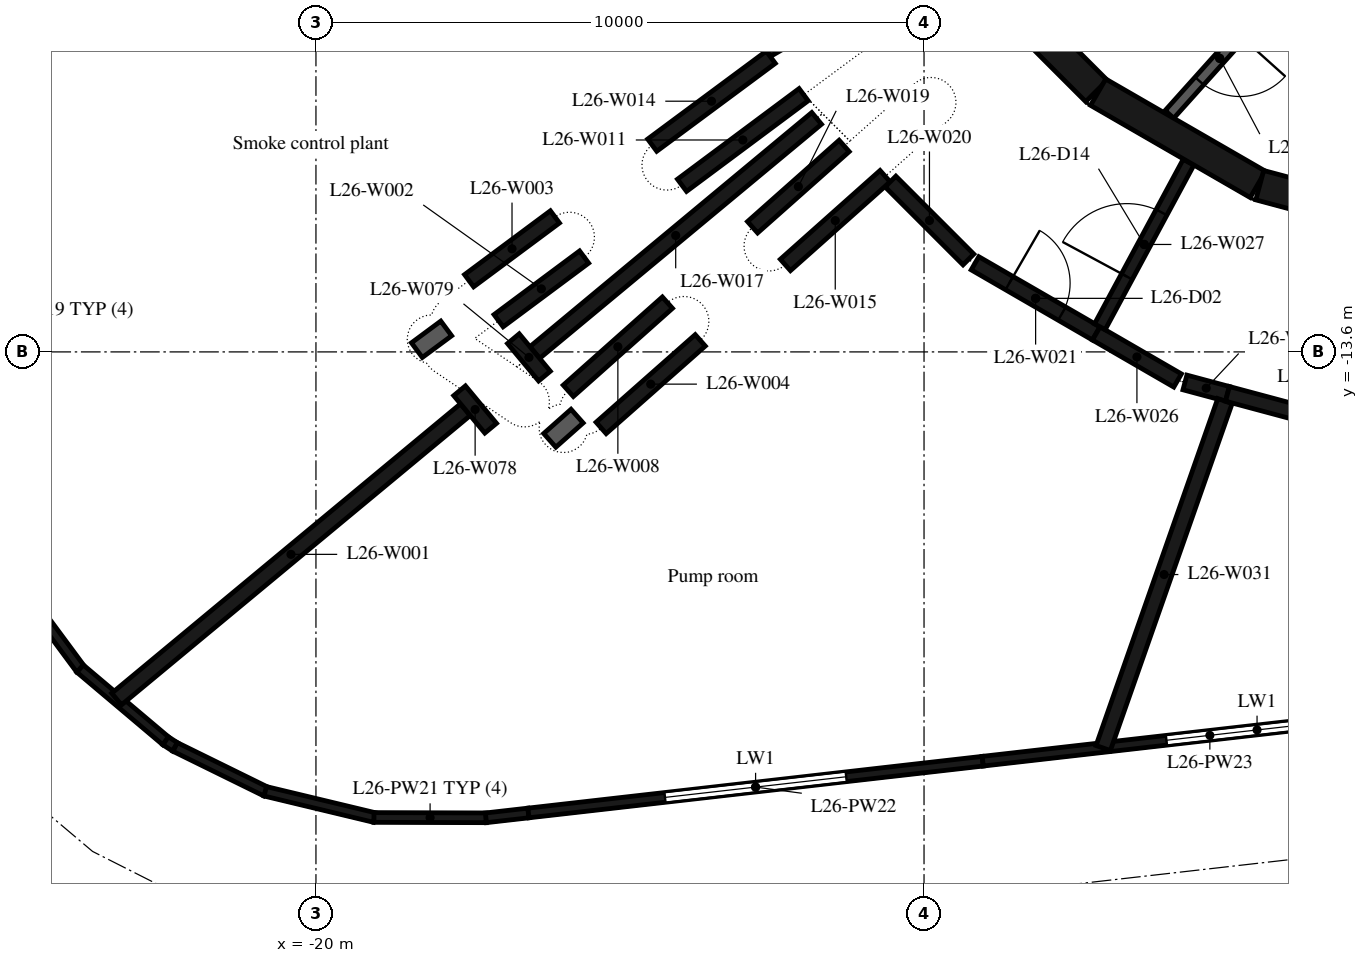
"""IFC4 building model, lengths in metres.
Left out: names, types, materials, properties, quantities, classifications, styles, units other than length and angle.
Written with IfcOpenShell. Run it as: python <this file> out.ifc"""

import sys

from ifc_helpers import new_model, si_unit, direction, frame, frame_2d, origin, place, context, subcontext, project, spatial, rectangle, extrude, element, fill, save


model = new_model("IFC4")
c1 = context("Model", 3, precision=1e-05, world=origin(), true_north=direction((0.0, 1.0)))
c2 = subcontext(c1, "Body", "Model", "MODEL_VIEW")
j1 = project(units=[si_unit("LENGTHUNIT", "METRE"), si_unit("PLANEANGLEUNIT", "RADIAN")], contexts=[c1])
p1 = place(None, origin())
s1 = spatial("IfcSite", under=j1, at=p1, CompositionType="ELEMENT")
p2 = place(p1, origin())
s2 = spatial("IfcBuilding", under=s1, at=p2, CompositionType="ELEMENT")
p3 = place(p2, frame((0.0, 0.0, 108.2)))
s3 = spatial("IfcBuildingStorey", under=s2, at=p3, CompositionType="ELEMENT", Elevation=108.2)
p4 = place(p3, frame((-22.084, -2.696, 0.0), z_axis=(0.0, 0.0, 1.0), x_axis=(-0.398737984544, -0.917064893932, 0.0)))
e1 = element("IfcWall", 1, at=p4, inside=s3, PredefinedType="STANDARD", context=c2, shape_type="SweptSolid", body=[
    extrude(rectangle(XDim=7.519, YDim=0.16, at=frame_2d((3.759, 0.0))), origin(), (0.0, 0.0, 1.0), 4.75),
])
p5 = place(p3, frame((-24.972, -17.329, 0.0), z_axis=(0.0, 0.0, 1.0), x_axis=(0.594788380253, -0.803882318947, 0.0)))
e2 = element("IfcWall", 2, at=p5, inside=s3, PredefinedType="STANDARD", context=c2, shape_type="SweptSolid", body=[
    extrude(rectangle(XDim=1.848, YDim=0.16, at=frame_2d((0.924, 0.0))), origin(), (0.0, 0.0, 1.0), 4.75),
])
p6 = place(p3, frame((-23.879, -18.808, 0.0), z_axis=(0.0, 0.0, 1.0), x_axis=(0.76410813609, -0.645088177198, 0.0)))
e3 = element("IfcWall", 3, at=p6, inside=s3, PredefinedType="STANDARD", context=c2, shape_type="SweptSolid", body=[
    extrude(rectangle(XDim=1.846, YDim=0.16, at=frame_2d((0.923, 0.0))), origin(), (0.0, 0.0, 1.0), 4.75),
])
p7 = place(p3, frame((-22.472, -19.995, 0.0), z_axis=(0.0, 0.0, 1.0), x_axis=(0.840238765122, -0.542216578118, 0.0)))
e4 = element("IfcWall", 4, at=p7, inside=s3, PredefinedType="STANDARD", context=c2, shape_type="SweptSolid", body=[
    extrude(rectangle(XDim=0.186, YDim=0.16, at=frame_2d((0.093, 0.0))), origin(), (0.0, 0.0, 1.0), 4.75),
])
p8 = place(p3, frame((-22.316, -20.096, 0.0), z_axis=(0.0, 0.0, 1.0), x_axis=(0.897492078532, -0.441030576007, 0.0)))
e5 = element("IfcWall", 5, at=p8, inside=s3, PredefinedType="STANDARD", context=c2, shape_type="SweptSolid", body=[
    extrude(rectangle(XDim=1.661, YDim=0.16, at=frame_2d((0.831, 0.0))), origin(), (0.0, 0.0, 1.0), 4.75),
])
p9 = place(p3, frame((-20.833, -20.826, 0.0), z_axis=(0.0, 0.0, 1.0), x_axis=(0.972369310611, -0.233447903784, 0.0)))
e6 = element("IfcWall", 6, at=p9, inside=s3, PredefinedType="STANDARD", context=c2, shape_type="SweptSolid", body=[
    extrude(rectangle(XDim=1.848, YDim=0.16, at=frame_2d((0.924, 0.0))), origin(), (0.0, 0.0, 1.0), 4.75),
])
p10 = place(p3, frame((-19.046, -21.256, 0.0), z_axis=(0.0, 0.0, 1.0), x_axis=(0.999995373376, -0.003041911597, 0.0)))
e7 = element("IfcWall", 7, at=p10, inside=s3, PredefinedType="STANDARD", context=c2, shape_type="SweptSolid", body=[
    extrude(rectangle(XDim=1.846, YDim=0.16, at=frame_2d((0.923, 0.0))), origin(), (0.0, 0.0, 1.0), 4.75),
])
p11 = place(p3, frame((-17.205, -21.262, 0.0), z_axis=(0.0, 0.0, 1.0), x_axis=(0.993584007949, 0.113096503698, 0.0)))
e8 = element("IfcWall", 8, at=p11, inside=s3, PredefinedType="STANDARD", context=c2, shape_type="SweptSolid", body=[
    extrude(rectangle(XDim=0.704, YDim=0.16, at=frame_2d((0.352, 0.0))), origin(), (0.0, 0.0, 1.0), 4.75),
])
p12 = place(p3, frame((-16.505, -21.182, 0.0), z_axis=(0.0, 0.0, 1.0), x_axis=(0.993573424553, 0.113189443072, 0.0)))
e9 = element("IfcWall", 9, at=p12, inside=s3, PredefinedType="STANDARD", context=c2, shape_type="SweptSolid", body=[
    extrude(rectangle(XDim=7.519, YDim=0.16, at=frame_2d((3.76, 0.0))), origin(), (0.0, 0.0, 1.0), 4.75),
])
p13 = place(p12, frame((2.26, 0.0, 1.0)))
e10 = element("IfcOpeningElement", 10, at=p13, cuts=e9, PredefinedType="OPENING", context=c2, shape_type="SweptSolid", body=[
    extrude(rectangle(XDim=3.0, YDim=2.2, at=frame_2d((1.5, 1.1))), frame((0.0, 0.09, 0.0), z_axis=(0.0, -1.0, 0.0), x_axis=(1.0, 0.0, 0.0)), (0.0, 0.0, 1.0), 0.18),
])
p14 = place(p3, frame((-9.035, -20.331, 0.0), z_axis=(0.0, 0.0, 1.0), x_axis=(0.993569356187, 0.113225149352, 0.0)))
e11 = element("IfcWall", 11, at=p14, inside=s3, PredefinedType="STANDARD", context=c2, shape_type="SweptSolid", body=[
    extrude(rectangle(XDim=7.519, YDim=0.16, at=frame_2d((3.759, 0.0))), origin(), (0.0, 0.0, 1.0), 4.75),
])
p15 = place(p14, frame((3.041, 0.0, 1.0)))
e12 = element("IfcOpeningElement", 12, at=p15, cuts=e11, PredefinedType="OPENING", context=c2, shape_type="SweptSolid", body=[
    extrude(rectangle(XDim=3.0, YDim=2.2, at=frame_2d((1.5, 1.1))), frame((0.0, 0.09, 0.0), z_axis=(0.0, -1.0, 0.0), x_axis=(1.0, 0.0, 0.0)), (0.0, 0.0, 1.0), 0.18),
])
p16 = place(p3, frame((-9.308, -7.164, 0.0), z_axis=(0.0, 0.0, 1.0), x_axis=(0.707106781187, -0.707106781187, 0.0)))
e13 = element("IfcWall", 13, at=p16, inside=s3, PredefinedType="SHEAR", context=c2, shape_type="SweptSolid", body=[
    extrude(rectangle(XDim=3.032, YDim=0.5, at=frame_2d((1.516, 0.0))), origin(), (0.0, 0.0, 1.0), 4.75),
])
for number, where, z_axis, x_axis in (
    (14, (-7.137, -9.329, 0.0), (0.0, 0.0, 1.0), (0.866, -0.5, 0.0)),
    (15, (-4.479, -10.858, 0.0), (0.0, 0.0, 1.0), (0.966, -0.259, 0.0)),
):
    element("IfcWall", number, at=place(p3, frame(where, z_axis=z_axis, x_axis=x_axis)), inside=s3, PredefinedType="SHEAR", context=c2, shape_type="SweptSolid", body=[
        extrude(rectangle(XDim=3.033, YDim=0.5, at=frame_2d((1.516, 0.0))), origin(), (0.0, 0.0, 1.0), 4.75),
    ])
p17 = place(p3, frame((-4.311, -7.851, 0.0), z_axis=(0.0, 0.0, 1.0), x_axis=(-0.667869133096, -0.744278725383, 0.0)))
e16 = element("IfcWall", 16, at=p17, inside=s3, PredefinedType="PARTITIONING", context=c2, shape_type="SweptSolid", body=[
    extrude(rectangle(XDim=2.476, YDim=0.19, at=frame_2d((1.238, 0.0))), origin(), (0.0, 0.0, 1.0), 4.75),
])
p18 = place(p17, frame((0.738, 0.0, 0.0)))
e17 = element("IfcOpeningElement", 17, at=p18, cuts=e16, PredefinedType="OPENING", context=c2, shape_type="SweptSolid", body=[
    extrude(rectangle(XDim=1.0, YDim=2.4, at=frame_2d((0.5, 1.2))), frame((0.0, 0.105, 0.0), z_axis=(0.0, -1.0, 0.0), x_axis=(1.0, 0.0, 0.0)), (0.0, 0.0, 1.0), 0.21),
])
p19 = place(p3, frame((-17.542, -14.55, 0.0), z_axis=(0.0, 0.0, 1.0), x_axis=(-0.769578133533, -0.638552657491, 0.0)))
e18 = element("IfcWall", 18, at=p19, inside=s3, PredefinedType="PARTITIONING", context=c2, shape_type="SweptSolid", body=[
    extrude(rectangle(XDim=7.453, YDim=0.25, at=frame_2d((3.727, 0.0))), origin(), (0.0, 0.0, 1.0), 4.75),
])
p20 = place(p3, frame((-16.997, -13.087, 0.0), z_axis=(0.0, 0.0, 1.0), x_axis=(0.802183588965, 0.597077456948, 0.0)))
e19 = element("IfcWall", 19, at=p20, inside=s3, PredefinedType="PARTITIONING", context=c2, shape_type="SweptSolid", body=[
    extrude(rectangle(XDim=1.753, YDim=0.25, at=frame_2d((0.877, 0.0))), origin(), (0.0, 0.0, 1.0), 4.75),
])
p21 = place(p3, frame((-16.07, -11.38, 0.0), z_axis=(0.0, 0.0, 1.0), x_axis=(-0.802508356636, -0.596640878191, 0.0)))
e20 = element("IfcWall", 20, at=p21, inside=s3, PredefinedType="PARTITIONING", context=c2, shape_type="SweptSolid", body=[
    extrude(rectangle(XDim=1.759, YDim=0.25, at=frame_2d((0.879, 0.0))), origin(), (0.0, 0.0, 1.0), 4.75),
])
p22 = place(p3, frame((-15.31, -14.85, 0.0), z_axis=(0.0, 0.0, 1.0), x_axis=(0.749418447052, 0.662096663047, 0.0)))
e21 = element("IfcWall", 21, at=p22, inside=s3, PredefinedType="PARTITIONING", context=c2, shape_type="SweptSolid", body=[
    extrude(rectangle(XDim=2.175, YDim=0.25, at=frame_2d((1.088, 0.0))), origin(), (0.0, 0.0, 1.0), 4.75),
])
p23 = place(p3, frame((-14.22, -12.79, 0.0), z_axis=(0.0, 0.0, 1.0), x_axis=(-0.747193185721, -0.664606908791, 0.0)))
e22 = element("IfcWall", 22, at=p23, inside=s3, PredefinedType="PARTITIONING", context=c2, shape_type="SweptSolid", body=[
    extrude(rectangle(XDim=2.182, YDim=0.25, at=frame_2d((1.091, 0.0))), origin(), (0.0, 0.0, 1.0), 4.75),
])
p24 = place(p3, frame((-14.007, -5.938, 0.0), z_axis=(0.0, 0.0, 1.0), x_axis=(0.501060572221, -0.865412215632, 0.0)))
e23 = element("IfcWall", 23, at=p24, inside=s3, PredefinedType="PARTITIONING", context=c2, shape_type="SweptSolid", body=[
    extrude(rectangle(XDim=3.168, YDim=0.25, at=frame_2d((1.584, 0.0))), origin(), (0.0, 0.0, 1.0), 4.75),
])
p25 = place(p3, frame((-13.98, -10.86, 0.0), z_axis=(0.0, 0.0, 1.0), x_axis=(0.80192236943, 0.597428249589, 0.0)))
e24 = element("IfcWall", 24, at=p25, inside=s3, PredefinedType="PARTITIONING", context=c2, shape_type="SweptSolid", body=[
    extrude(rectangle(XDim=2.494, YDim=0.25, at=frame_2d((1.247, 0.0))), origin(), (0.0, 0.0, 1.0), 4.75),
])
p26 = place(p3, frame((-12.521, -8.754, 0.0), z_axis=(0.0, 0.0, 1.0), x_axis=(-0.803259492536, -0.595629236732, 0.0)))
e25 = element("IfcWall", 25, at=p26, inside=s3, PredefinedType="PARTITIONING", context=c2, shape_type="SweptSolid", body=[
    extrude(rectangle(XDim=2.427, YDim=0.25, at=frame_2d((1.213, 0.0))), origin(), (0.0, 0.0, 1.0), 4.75),
])
p27 = place(p3, frame((-12.28, -12.17, 0.0), z_axis=(0.0, 0.0, 1.0), x_axis=(0.746942923143, 0.664888163202, 0.0)))
e26 = element("IfcWall", 26, at=p27, inside=s3, PredefinedType="PARTITIONING", context=c2, shape_type="SweptSolid", body=[
    extrude(rectangle(XDim=2.196, YDim=0.25, at=frame_2d((1.098, 0.0))), origin(), (0.0, 0.0, 1.0), 4.75),
])
p28 = place(p3, frame((-11.766, -9.76, 0.0), z_axis=(0.0, 0.0, 1.0), x_axis=(-0.769226522348, -0.63897617899, 0.0)))
e27 = element("IfcWall", 27, at=p28, inside=s3, PredefinedType="PARTITIONING", context=c2, shape_type="SweptSolid", body=[
    extrude(rectangle(XDim=6.026, YDim=0.25, at=frame_2d((3.013, 0.0))), origin(), (0.0, 0.0, 1.0), 4.75),
])
p29 = place(p3, frame((-11.313, -10.213, 0.0), z_axis=(0.0, 0.0, 1.0), x_axis=(-0.747910613197, -0.663799453651, 0.0)))
e28 = element("IfcWall", 28, at=p29, inside=s3, PredefinedType="PARTITIONING", context=c2, shape_type="SweptSolid", body=[
    extrude(rectangle(XDim=2.014, YDim=0.25, at=frame_2d((1.007, 0.0))), origin(), (0.0, 0.0, 1.0), 4.75),
])
p30 = place(p3, frame((-10.552, -10.798, 0.0), z_axis=(0.0, 0.0, 1.0), x_axis=(0.707039428062, -0.707174127896, 0.0)))
e29 = element("IfcWall", 29, at=p30, inside=s3, PredefinedType="PARTITIONING", context=c2, shape_type="SweptSolid", body=[
    extrude(rectangle(XDim=1.812, YDim=0.25, at=frame_2d((0.906, 0.0))), origin(), (0.0, 0.0, 1.0), 4.75),
])
p31 = place(p3, frame((-9.162, -12.143, 0.0), z_axis=(0.0, 0.0, 1.0), x_axis=(0.865576208327, -0.500777223502, 0.0)))
e30 = element("IfcWall", 30, at=p31, inside=s3, PredefinedType="PARTITIONING", context=c2, shape_type="SweptSolid", body=[
    extrude(rectangle(XDim=2.303, YDim=0.25, at=frame_2d((1.152, 0.0))), origin(), (0.0, 0.0, 1.0), 4.75),
])
p32 = place(p31, frame((0.652, 0.0, 0.0)))
e31 = element("IfcOpeningElement", 31, at=p32, cuts=e30, PredefinedType="OPENING", context=c2, shape_type="SweptSolid", body=[
    extrude(rectangle(XDim=1.0, YDim=2.1, at=frame_2d((0.5, 1.05))), frame((0.0, 0.135, 0.0), z_axis=(0.0, -1.0, 0.0), x_axis=(1.0, 0.0, 0.0)), (0.0, 0.0, 1.0), 0.27),
])
p33 = place(p3, frame((-7.168, -13.296, 0.0), z_axis=(0.0, 0.0, 1.0), x_axis=(0.865606471313, -0.500724911325, 0.0)))
e32 = element("IfcWall", 32, at=p33, inside=s3, PredefinedType="PARTITIONING", context=c2, shape_type="SweptSolid", body=[
    extrude(rectangle(XDim=1.546, YDim=0.25, at=frame_2d((0.773, 0.0))), origin(), (0.0, 0.0, 1.0), 4.75),
])
p34 = place(p3, frame((-7.109, -13.186, 0.0), z_axis=(0.0, 0.0, 1.0), x_axis=(0.474511788195, 0.880249148176, 0.0)))
e33 = element("IfcWall", 33, at=p34, inside=s3, PredefinedType="PARTITIONING", context=c2, shape_type="SweptSolid", body=[
    extrude(rectangle(XDim=3.074, YDim=0.2, at=frame_2d((1.537, 0.0))), origin(), (0.0, 0.0, 1.0), 4.75),
])
p35 = place(p34, frame((0.937, 0.0, 0.0)))
e34 = element("IfcOpeningElement", 34, at=p35, cuts=e33, PredefinedType="OPENING", context=c2, shape_type="SweptSolid", body=[
    extrude(rectangle(XDim=1.2, YDim=2.1, at=frame_2d((0.6, 1.05))), frame((0.0, 0.11, 0.0), z_axis=(0.0, -1.0, 0.0), x_axis=(1.0, 0.0, 0.0)), (0.0, 0.0, 1.0), 0.22),
])
p36 = place(p3, frame((-5.709, -14.102, 0.0), z_axis=(0.0, 0.0, 1.0), x_axis=(0.965791356005, -0.25932037457, 0.0)))
e35 = element("IfcWall", 35, at=p36, inside=s3, PredefinedType="PARTITIONING", context=c2, shape_type="SweptSolid", body=[
    extrude(rectangle(XDim=0.724, YDim=0.25, at=frame_2d((0.362, 0.0))), origin(), (0.0, 0.0, 1.0), 4.75),
])
p37 = place(p3, frame((-5.051, -14.408, 0.0), z_axis=(0.0, 0.0, 1.0), x_axis=(-0.331073209048, -0.943605071124, 0.0)))
e36 = element("IfcWall", 36, at=p37, inside=s3, PredefinedType="PARTITIONING", context=c2, shape_type="SweptSolid", body=[
    extrude(rectangle(XDim=6.048, YDim=0.25, at=frame_2d((3.024, 0.0))), origin(), (0.0, 0.0, 1.0), 4.75),
])
p38 = place(p3, frame((-5.01, -14.29, 0.0), z_axis=(0.0, 0.0, 1.0), x_axis=(0.965858087727, -0.259071716659, 0.0)))
e37 = element("IfcWall", 37, at=p38, inside=s3, PredefinedType="PARTITIONING", context=c2, shape_type="SweptSolid", body=[
    extrude(rectangle(XDim=3.127, YDim=0.25, at=frame_2d((1.563, 0.0))), origin(), (0.0, 0.0, 1.0), 4.75),
])
p39 = place(p3, frame((-17.127, -14.854, 0.0), z_axis=(0.0, 0.0, 1.0), x_axis=(-0.638591701228, 0.769545735562, 0.0)))
e38 = element("IfcWall", 38, at=p39, inside=s3, PredefinedType="PARTITIONING", context=c2, shape_type="SweptSolid", body=[
    extrude(rectangle(XDim=0.8, YDim=0.25, at=frame_2d((0.4, 0.0))), origin(), (0.0, 0.0, 1.0), 4.75),
])
p40 = place(p3, frame((-16.753, -13.383, 0.0), z_axis=(0.0, 0.0, 1.0), x_axis=(0.638772420088, -0.769395733895, 0.0)))
e39 = element("IfcWall", 39, at=p40, inside=s3, PredefinedType="PARTITIONING", context=c2, shape_type="SweptSolid", body=[
    extrude(rectangle(XDim=0.8, YDim=0.25, at=frame_2d((0.4, 0.0))), origin(), (0.0, 0.0, 1.0), 4.75),
])
p41 = place(p13, origin())
e40 = element("IfcWindow", 40, at=p41, inside=s3, PartitioningType="SINGLE_PANEL", PredefinedType="WINDOW", context=c2, shape_type="SweptSolid", body=[
    extrude(rectangle(XDim=3.0, YDim=2.2, at=frame_2d((1.5, 1.1))), frame((0.0, 0.03, 0.0), z_axis=(0.0, -1.0, 0.0), x_axis=(1.0, 0.0, 0.0)), (0.0, 0.0, 1.0), 0.06),
])
fill(e10, e40)
p42 = place(p15, origin())
e41 = element("IfcWindow", 41, at=p42, inside=s3, PartitioningType="SINGLE_PANEL", PredefinedType="WINDOW", context=c2, shape_type="SweptSolid", body=[
    extrude(rectangle(XDim=3.0, YDim=2.2, at=frame_2d((1.5, 1.1))), frame((0.0, 0.03, 0.0), z_axis=(0.0, -1.0, 0.0), x_axis=(1.0, 0.0, 0.0)), (0.0, 0.0, 1.0), 0.06),
])
fill(e12, e41)
p43 = place(p18, origin())
e42 = element("IfcDoor", 42, at=p43, inside=s3, OperationType="SINGLE_SWING_LEFT", PredefinedType="DOOR", context=c2, shape_type="SweptSolid", body=[
    extrude(rectangle(XDim=1.0, YDim=2.4, at=frame_2d((0.5, 1.2))), frame((0.0, 0.025, 0.0), z_axis=(0.0, -1.0, 0.0), x_axis=(1.0, 0.0, 0.0)), (0.0, 0.0, 1.0), 0.05),
])
fill(e17, e42)
p44 = place(p32, origin())
e43 = element("IfcDoor", 43, at=p44, inside=s3, OperationType="SINGLE_SWING_LEFT", PredefinedType="DOOR", context=c2, shape_type="SweptSolid", body=[
    extrude(rectangle(XDim=1.0, YDim=2.1, at=frame_2d((0.5, 1.05))), frame((0.0, 0.025, 0.0), z_axis=(0.0, -1.0, 0.0), x_axis=(1.0, 0.0, 0.0)), (0.0, 0.0, 1.0), 0.05),
])
fill(e31, e43)
p45 = place(p35, origin())
e44 = element("IfcDoor", 44, at=p45, inside=s3, OperationType="SINGLE_SWING_LEFT", PredefinedType="DOOR", context=c2, shape_type="SweptSolid", body=[
    extrude(rectangle(XDim=1.2, YDim=2.1, at=frame_2d((0.6, 1.05))), frame((0.0, 0.025, 0.0), z_axis=(0.0, -1.0, 0.0), x_axis=(1.0, 0.0, 0.0)), (0.0, 0.0, 1.0), 0.05),
])
fill(e34, e44)
save(model, sys.argv[1])
